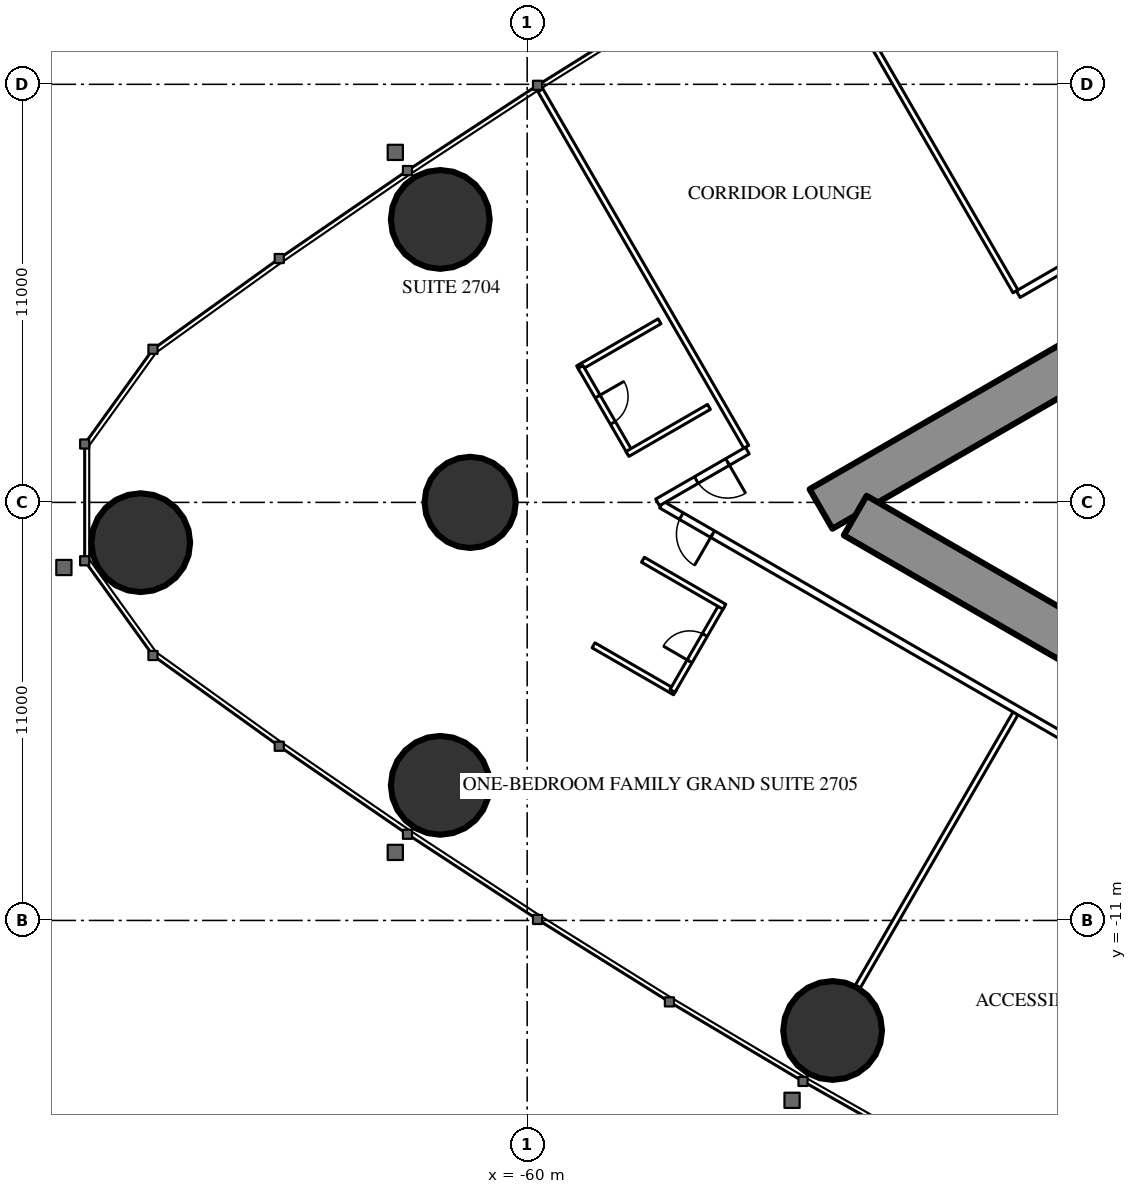
"""IFC4 building model, lengths in metres.
Left out: names, types, materials, properties, quantities, classifications, styles, units other than length and angle.
Written with IfcOpenShell. Run it as: python <this file> out.ifc"""

import sys

from ifc_helpers import new_model, si_unit, direction, frame, frame_2d, origin, origin_2d, place, context, subcontext, project, spatial, rectangle, circle, hollow_circle, extrude, element, fill, save


model = new_model("IFC4")
c1 = context("Model", 3, precision=1e-05, world=origin(), true_north=direction((0.0, 1.0)))
c2 = subcontext(c1, "Body", "Model", "MODEL_VIEW")
j1 = project(units=[si_unit("LENGTHUNIT", "METRE"), si_unit("PLANEANGLEUNIT", "RADIAN")], contexts=[c1])
p1 = place(None, origin())
s1 = spatial("IfcSite", under=j1, at=p1, CompositionType="ELEMENT")
p2 = place(p1, origin())
s2 = spatial("IfcBuilding", under=s1, at=p2, CompositionType="ELEMENT")
p3 = place(p2, frame((0.0, 0.0, 104.6)))
s3 = spatial("IfcBuildingStorey", under=s2, at=p3, CompositionType="ELEMENT", Elevation=104.6)
for number, where, z_axis, x_axis in (
    (1, (-70.168, -1.06, 0.0), (0.0, 0.0, 1.0), (1.0, 0.0, 0.0)),
    (2, (-62.287, -7.445, 0.0), (0.0, 0.0, 1.0), (1.0, 0.0, 0.0)),
    (3, (-51.963, -13.895, 0.0), (0.0, 0.0, 1.0), (1.0, 0.0, 0.0)),
    (4, (-62.287, 7.445, 0.0), (0.0, 0.0, 1.0), (1.0, 0.0, 0.0)),
):
    element("IfcColumn", number, at=place(p3, frame(where, z_axis=z_axis, x_axis=x_axis)), inside=s3, PredefinedType="COLUMN", context=c2, shape_type="SweptSolid", body=[
        extrude(hollow_circle(Radius=1.3, WallThickness=0.1, at=origin_2d()), origin(), (0.0, 0.0, 1.0), 3.5),
    ])
p4 = place(p3, frame((-61.5, 0.0, 0.0), z_axis=(0.0, 0.0, 1.0), x_axis=(1.0, 0.0, 0.0)))
e5 = element("IfcColumn", 5, at=p4, inside=s3, PredefinedType="COLUMN", context=c2, shape_type="SweptSolid", body=[
    extrude(circle(Radius=1.2, at=origin_2d()), origin(), (0.0, 0.0, 1.0), 3.5),
])
p5 = place(p3, frame((-27.2, 14.3, 0.0), z_axis=(0.0, 0.0, 1.0), x_axis=(-0.866026593062, -0.499997940104, 0.0)))
e6 = element("IfcWall", 6, at=p5, inside=s3, PredefinedType="SHEAR", context=c2, shape_type="SweptSolid", body=[
    extrude(rectangle(XDim=28.946, YDim=1.2, at=frame_2d((14.473, 0.0))), origin(), (0.0, 0.0, 1.0), 3.5),
])
p6 = place(p5, frame((4.6, 0.0, 0.0)))
e7 = element("IfcOpeningElement", 7, at=p6, cuts=e6, PredefinedType="OPENING", context=c2, shape_type="SweptSolid", body=[
    extrude(rectangle(XDim=1.0, YDim=2.2, at=frame_2d((0.5, 1.1))), frame((0.0, 0.61, 0.0), z_axis=(0.0, -1.0, 0.0), x_axis=(1.0, 0.0, 0.0)), (0.0, 0.0, 1.0), 1.22),
])
p7 = place(p5, frame((13.395, 0.0, 0.0)))
e8 = element("IfcOpeningElement", 8, at=p7, cuts=e6, PredefinedType="OPENING", context=c2, shape_type="SweptSolid", body=[
    extrude(rectangle(XDim=1.8, YDim=2.2, at=frame_2d((0.9, 1.1))), frame((0.0, 0.61, 0.0), z_axis=(0.0, -1.0, 0.0), x_axis=(1.0, 0.0, 0.0)), (0.0, 0.0, 1.0), 1.22),
])
p8 = place(p3, frame((-27.2, -14.3, 0.0), z_axis=(0.0, 0.0, 1.0), x_axis=(-0.866024021859, 0.500002393557, 0.0)))
e9 = element("IfcWall", 9, at=p8, inside=s3, PredefinedType="SHEAR", context=c2, shape_type="SweptSolid", body=[
    extrude(rectangle(XDim=27.907, YDim=1.2, at=frame_2d((13.954, 0.0))), origin(), (0.0, 0.0, 1.0), 3.5),
])
p9 = place(p8, frame((4.6, 0.0, 0.0)))
e10 = element("IfcOpeningElement", 10, at=p9, cuts=e9, PredefinedType="OPENING", context=c2, shape_type="SweptSolid", body=[
    extrude(rectangle(XDim=1.0, YDim=2.2, at=frame_2d((0.5, 1.1))), frame((0.0, 0.61, 0.0), z_axis=(0.0, -1.0, 0.0), x_axis=(1.0, 0.0, 0.0)), (0.0, 0.0, 1.0), 1.22),
])
p10 = place(p8, frame((13.395, 0.0, 0.0)))
e11 = element("IfcOpeningElement", 11, at=p10, cuts=e9, PredefinedType="OPENING", context=c2, shape_type="SweptSolid", body=[
    extrude(rectangle(XDim=1.8, YDim=2.2, at=frame_2d((0.9, 1.1))), frame((0.0, 0.61, 0.0), z_axis=(0.0, -1.0, 0.0), x_axis=(1.0, 0.0, 0.0)), (0.0, 0.0, 1.0), 1.22),
])
p11 = place(p3, frame((-47.151, 5.552, 0.0), z_axis=(0.0, 0.0, 1.0), x_axis=(-0.500003012045, 0.866023664773, 0.0)))
e12 = element("IfcWall", 12, at=p11, inside=s3, PredefinedType="PARTITIONING", context=c2, shape_type="SweptSolid", body=[
    extrude(rectangle(XDim=8.311, YDim=0.15, at=frame_2d((4.156, 0.0))), origin(), (0.0, 0.0, 1.0), 2.2),
])
p12 = place(p3, frame((-54.236, 1.462, 0.0), z_axis=(0.0, 0.0, 1.0), x_axis=(-0.499990351854, 0.866030974073, 0.0)))
e13 = element("IfcWall", 13, at=p12, inside=s3, PredefinedType="PARTITIONING", context=c2, shape_type="SweptSolid", body=[
    extrude(rectangle(XDim=10.834, YDim=0.15, at=frame_2d((5.417, 0.0))), origin(), (0.0, 0.0, 1.0), 3.25),
])
p13 = place(p3, frame((-47.151, -5.552, 0.0), z_axis=(0.0, 0.0, 1.0), x_axis=(-0.500003012045, -0.866023664773, 0.0)))
e14 = element("IfcWall", 14, at=p13, inside=s3, PredefinedType="PARTITIONING", context=c2, shape_type="SweptSolid", body=[
    extrude(rectangle(XDim=8.311, YDim=0.15, at=frame_2d((4.156, 0.0))), origin(), (0.0, 0.0, 1.0), 2.2),
])
p14 = place(p3, frame((-36.92, -11.344, 0.0), z_axis=(0.0, 0.0, 1.0), x_axis=(-0.866028313256, 0.499994960614, 0.0)))
e15 = element("IfcWall", 15, at=p14, inside=s3, PredefinedType="PARTITIONING", context=c2, shape_type="SweptSolid", body=[
    extrude(rectangle(XDim=22.568, YDim=0.2, at=frame_2d((11.284, 0.0))), origin(), (0.0, 0.0, 1.0), 3.25),
])
p15 = place(p14, frame((21.018, 0.0, 0.0)))
e16 = element("IfcOpeningElement", 16, at=p15, cuts=e15, PredefinedType="OPENING", context=c2, shape_type="SweptSolid", body=[
    extrude(rectangle(XDim=0.95, YDim=2.2, at=frame_2d((0.475, 1.1))), frame((0.0, 0.11, 0.0), z_axis=(0.0, -1.0, 0.0), x_axis=(1.0, 0.0, 0.0)), (0.0, 0.0, 1.0), 0.22),
])
p16 = place(p14, frame((3.35, 0.0, 0.0)))
e17 = element("IfcOpeningElement", 17, at=p16, cuts=e15, PredefinedType="OPENING", context=c2, shape_type="SweptSolid", body=[
    extrude(rectangle(XDim=1.0, YDim=2.2, at=frame_2d((0.5, 1.1))), frame((0.0, 0.11, 0.0), z_axis=(0.0, -1.0, 0.0), x_axis=(1.0, 0.0, 0.0)), (0.0, 0.0, 1.0), 0.22),
])
p17 = place(p3, frame((-37.7, 10.894, 0.0), z_axis=(0.0, 0.0, 1.0), x_axis=(-0.866027551079, -0.499996280759, 0.0)))
e18 = element("IfcWall", 18, at=p17, inside=s3, PredefinedType="PARTITIONING", context=c2, shape_type="SweptSolid", body=[
    extrude(rectangle(XDim=10.831, YDim=0.2, at=frame_2d((5.415, 0.0))), origin(), (0.0, 0.0, 1.0), 3.25),
])
p18 = place(p17, frame((0.6, 0.0, 0.0)))
e19 = element("IfcOpeningElement", 19, at=p18, cuts=e18, PredefinedType="OPENING", context=c2, shape_type="SweptSolid", body=[
    extrude(rectangle(XDim=0.95, YDim=2.2, at=frame_2d((0.475, 1.1))), frame((0.0, 0.11, 0.0), z_axis=(0.0, -1.0, 0.0), x_axis=(1.0, 0.0, 0.0)), (0.0, 0.0, 1.0), 0.22),
])
p19 = place(p3, frame((-54.207, 1.363, 0.0), z_axis=(0.0, 0.0, 1.0), x_axis=(-0.866046902845, -0.499962760685, 0.0)))
e20 = element("IfcWall", 20, at=p19, inside=s3, PredefinedType="PARTITIONING", context=c2, shape_type="SweptSolid", body=[
    extrude(rectangle(XDim=2.726, YDim=0.2, at=frame_2d((1.363, 0.0))), origin(), (0.0, 0.0, 1.0), 3.25),
])
p20 = place(p19, frame((0.6, 0.0, 0.0)))
e21 = element("IfcOpeningElement", 21, at=p20, cuts=e20, PredefinedType="OPENING", context=c2, shape_type="SweptSolid", body=[
    extrude(rectangle(XDim=0.95, YDim=2.2, at=frame_2d((0.475, 1.1))), frame((0.0, 0.11, 0.0), z_axis=(0.0, -1.0, 0.0), x_axis=(1.0, 0.0, 0.0)), (0.0, 0.0, 1.0), 0.22),
])
p21 = place(p3, frame((-56.517, 4.764, 0.0), z_axis=(0.0, 0.0, 1.0), x_axis=(-0.866031185235, -0.4999899861, 0.0)))
e22 = element("IfcWall", 22, at=p21, inside=s3, PredefinedType="PARTITIONING", context=c2, shape_type="SweptSolid", body=[
    extrude(rectangle(XDim=2.475, YDim=0.15, at=frame_2d((1.238, 0.0))), origin(), (0.0, 0.0, 1.0), 3.25),
])
p22 = place(p3, frame((-57.296, 1.312, 0.0), z_axis=(0.0, 0.0, 1.0), x_axis=(-0.49997716683, 0.86603858612, 0.0)))
e23 = element("IfcWall", 23, at=p22, inside=s3, PredefinedType="PARTITIONING", context=c2, shape_type="SweptSolid", body=[
    extrude(rectangle(XDim=2.6, YDim=0.15, at=frame_2d((1.3, 0.0))), origin(), (0.0, 0.0, 1.0), 3.25),
])
p23 = place(p22, frame((0.9, 0.0, 0.0)))
e24 = element("IfcOpeningElement", 24, at=p23, cuts=e23, PredefinedType="OPENING", context=c2, shape_type="SweptSolid", body=[
    extrude(rectangle(XDim=0.8, YDim=2.2, at=frame_2d((0.4, 1.1))), frame((0.0, 0.085, 0.0), z_axis=(0.0, -1.0, 0.0), x_axis=(1.0, 0.0, 0.0)), (0.0, 0.0, 1.0), 0.17),
])
for number, where, z_axis, x_axis in (
    (25, (-55.217, 2.512, 0.0), (0.0, 0.0, 1.0), (-0.866, -0.5, 0.0)),
    (26, (-56.111, -4.998, 0.0), (0.0, 0.0, 1.0), (-0.866, 0.5, 0.0)),
):
    element("IfcWall", number, at=place(p3, frame(where, z_axis=z_axis, x_axis=x_axis)), inside=s3, PredefinedType="PARTITIONING", context=c2, shape_type="SweptSolid", body=[
        extrude(rectangle(XDim=2.475, YDim=0.15, at=frame_2d((1.238, 0.0))), origin(), (0.0, 0.0, 1.0), 3.25),
    ])
p24 = place(p3, frame((-54.876, -2.709, 0.0), z_axis=(0.0, 0.0, 1.0), x_axis=(-0.500006934395, -0.866021400173, 0.0)))
e27 = element("IfcWall", 27, at=p24, inside=s3, PredefinedType="PARTITIONING", context=c2, shape_type="SweptSolid", body=[
    extrude(rectangle(XDim=2.6, YDim=0.15, at=frame_2d((1.3, 0.0))), origin(), (0.0, 0.0, 1.0), 3.25),
])
p25 = place(p24, frame((0.9, 0.0, 0.0)))
e28 = element("IfcOpeningElement", 28, at=p25, cuts=e27, PredefinedType="OPENING", context=c2, shape_type="SweptSolid", body=[
    extrude(rectangle(XDim=0.8, YDim=2.2, at=frame_2d((0.4, 1.1))), frame((0.0, 0.085, 0.0), z_axis=(0.0, -1.0, 0.0), x_axis=(1.0, 0.0, 0.0)), (0.0, 0.0, 1.0), 0.17),
])
p26 = place(p3, frame((-54.811, -2.747, 0.0), z_axis=(0.0, 0.0, 1.0), x_axis=(-0.866031185235, 0.4999899861, 0.0)))
e29 = element("IfcWall", 29, at=p26, inside=s3, PredefinedType="PARTITIONING", context=c2, shape_type="SweptSolid", body=[
    extrude(rectangle(XDim=2.475, YDim=0.15, at=frame_2d((1.238, 0.0))), origin(), (0.0, 0.0, 1.0), 3.25),
])
p27 = place(p23, origin())
e30 = element("IfcDoor", 30, at=p27, inside=s3, OperationType="SINGLE_SWING_RIGHT", PredefinedType="DOOR", context=c2, shape_type="SweptSolid", body=[
    extrude(rectangle(XDim=0.8, YDim=2.2, at=frame_2d((0.4, 1.1))), frame((0.0, 0.025, 0.0), z_axis=(0.0, -1.0, 0.0), x_axis=(1.0, 0.0, 0.0)), (0.0, 0.0, 1.0), 0.05),
])
fill(e24, e30)
p28 = place(p20, origin())
e31 = element("IfcDoor", 31, at=p28, inside=s3, OperationType="SINGLE_SWING_LEFT", PredefinedType="DOOR", context=c2, shape_type="SweptSolid", body=[
    extrude(rectangle(XDim=0.95, YDim=2.2, at=frame_2d((0.475, 1.1))), frame((0.0, 0.025, 0.0), z_axis=(0.0, -1.0, 0.0), x_axis=(1.0, 0.0, 0.0)), (0.0, 0.0, 1.0), 0.05),
])
fill(e21, e31)
p29 = place(p25, origin())
e32 = element("IfcDoor", 32, at=p29, inside=s3, OperationType="SINGLE_SWING_RIGHT", PredefinedType="DOOR", context=c2, shape_type="SweptSolid", body=[
    extrude(rectangle(XDim=0.8, YDim=2.2, at=frame_2d((0.4, 1.1))), frame((0.0, 0.025, 0.0), z_axis=(0.0, -1.0, 0.0), x_axis=(1.0, 0.0, 0.0)), (0.0, 0.0, 1.0), 0.05),
])
fill(e28, e32)
p30 = place(p15, origin())
e33 = element("IfcDoor", 33, at=p30, inside=s3, OperationType="SINGLE_SWING_LEFT", PredefinedType="DOOR", context=c2, shape_type="SweptSolid", body=[
    extrude(rectangle(XDim=0.95, YDim=2.2, at=frame_2d((0.475, 1.1))), frame((0.0, 0.025, 0.0), z_axis=(0.0, -1.0, 0.0), x_axis=(1.0, 0.0, 0.0)), (0.0, 0.0, 1.0), 0.05),
])
fill(e16, e33)
save(model, sys.argv[1])
